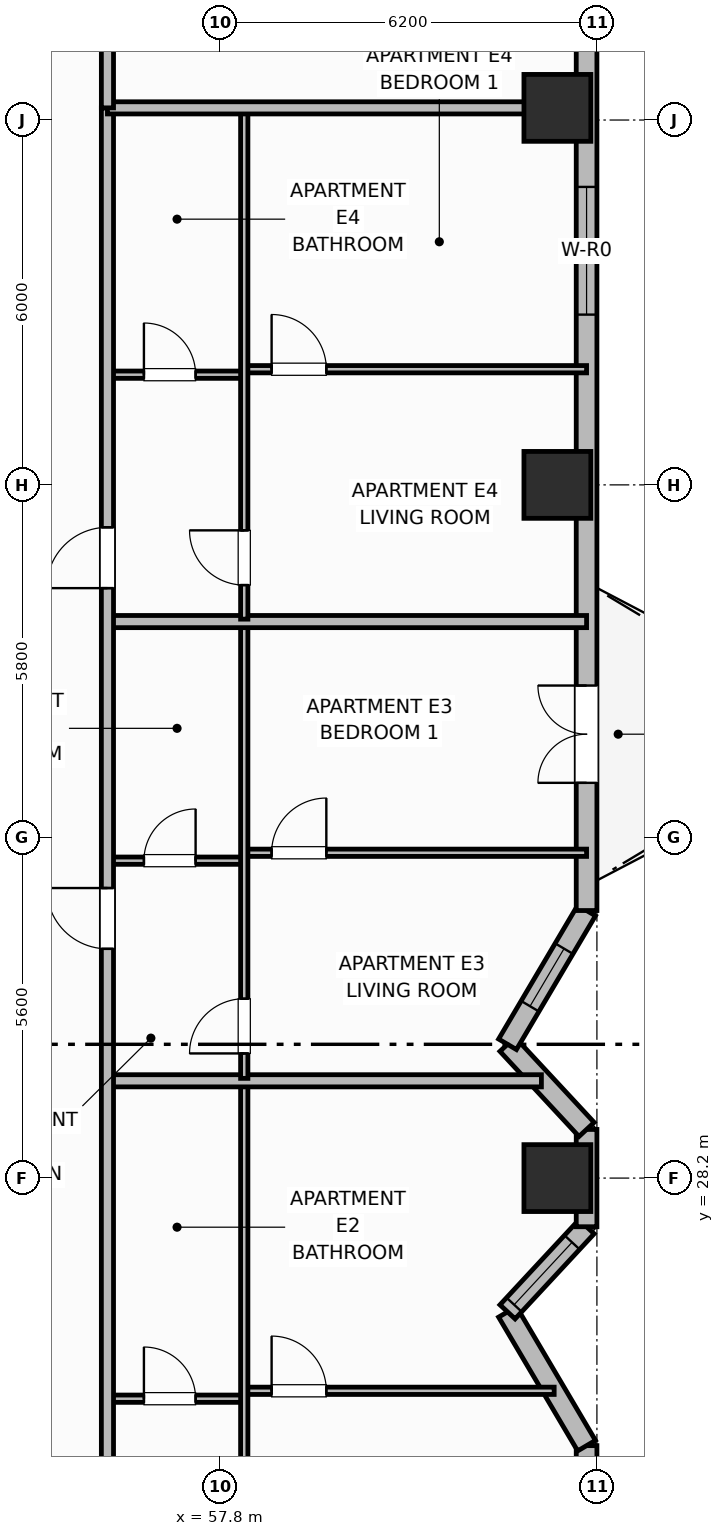
"""IFC4 building model, lengths in metres.
Left out: names, types, materials, properties, quantities, classifications, styles, units other than length and angle.
Written with IfcOpenShell. Run it as: python <this file> out.ifc"""

import sys

from ifc_helpers import new_model, si_unit, direction, frame, frame_2d, origin, origin_2d, place, context, subcontext, project, spatial, rectangle, extrude, element, fill, save


model = new_model("IFC4")
c1 = context("Model", 3, precision=1e-05, world=origin(), true_north=direction((0.0, 1.0)))
c2 = subcontext(c1, "Body", "Model", "MODEL_VIEW")
j1 = project(units=[si_unit("LENGTHUNIT", "METRE"), si_unit("PLANEANGLEUNIT", "RADIAN")], contexts=[c1])
p1 = place(None, origin())
s1 = spatial("IfcSite", under=j1, at=p1, CompositionType="ELEMENT")
p2 = place(p1, origin())
s2 = spatial("IfcBuilding", under=s1, at=p2, CompositionType="ELEMENT")
p3 = place(p2, frame((0.0, 0.0, 110.5)))
s3 = spatial("IfcBuildingStorey", under=s2, at=p3, CompositionType="ELEMENT", Elevation=110.5)
for number, where, z_axis, x_axis in (
    (1, (63.35, 28.2, 0.0), (0.0, 0.0, 1.0), (1.0, 0.0, 0.0)),
    (2, (63.35, 39.6, 0.0), (0.0, 0.0, 1.0), (1.0, 0.0, 0.0)),
    (3, (63.35, 45.8, 0.0), (0.0, 0.0, 1.0), (1.0, 0.0, 0.0)),
):
    element("IfcColumn", number, at=place(p3, frame(where, z_axis=z_axis, x_axis=x_axis)), inside=s3, PredefinedType="COLUMN", context=c2, shape_type="SweptSolid", body=[
        extrude(rectangle(XDim=1.1, YDim=1.1, at=origin_2d()), origin(), (0.0, 0.0, 1.0), 3.7),
    ])
p4 = place(p3, frame((63.83, 9.0, 0.0), z_axis=(0.0, 0.0, 1.0), x_axis=(0.0, 1.0, 0.0)))
e4 = element("IfcWall", 4, at=p4, inside=s3, PredefinedType="SOLIDWALL", context=c2, shape_type="SweptSolid", body=[
    extrude(rectangle(XDim=14.8, YDim=0.34, at=frame_2d((7.4, 0.0))), origin(), (0.0, 0.0, 1.0), 2.7),
])
p5 = place(p4, frame((4.15, 0.0, 0.93)))
e5 = element("IfcOpeningElement", 5, at=p5, cuts=e4, PredefinedType="OPENING", context=c2, shape_type="SweptSolid", body=[
    extrude(rectangle(XDim=1.1, YDim=1.65, at=frame_2d((0.55, 0.825))), frame((0.0, 0.18, 0.0), z_axis=(0.0, -1.0, 0.0), x_axis=(1.0, 0.0, 0.0)), (0.0, 0.0, 1.0), 0.36),
])
p6 = place(p4, frame((9.2, 0.0, 0.93)))
e6 = element("IfcOpeningElement", 6, at=p6, cuts=e4, PredefinedType="OPENING", context=c2, shape_type="SweptSolid", body=[
    extrude(rectangle(XDim=1.1, YDim=1.65, at=frame_2d((0.55, 0.825))), frame((0.0, 0.18, 0.0), z_axis=(0.0, -1.0, 0.0), x_axis=(1.0, 0.0, 0.0)), (0.0, 0.0, 1.0), 0.36),
])
p7 = place(p4, frame((12.25, 0.0, 0.93)))
e7 = element("IfcOpeningElement", 7, at=p7, cuts=e4, PredefinedType="OPENING", context=c2, shape_type="SweptSolid", body=[
    extrude(rectangle(XDim=1.1, YDim=1.65, at=frame_2d((0.55, 0.825))), frame((0.0, 0.18, 0.0), z_axis=(0.0, -1.0, 0.0), x_axis=(1.0, 0.0, 0.0)), (0.0, 0.0, 1.0), 0.36),
])
p8 = place(p3, frame((63.83, 23.8, 0.0), z_axis=(0.0, 0.0, 1.0), x_axis=(-0.508751843651, 0.860913213734, 0.0)))
e8 = element("IfcWall", 8, at=p8, inside=s3, PredefinedType="SOLIDWALL", context=c2, shape_type="SweptSolid", body=[
    extrude(rectangle(XDim=2.555, YDim=0.34, at=frame_2d((1.278, 0.0))), origin(), (0.0, 0.0, 1.0), 2.7),
])
p9 = place(p3, frame((62.53, 26.0, 0.0), z_axis=(0.0, 0.0, 1.0), x_axis=(0.68049031116, 0.732757078722, 0.0)))
e9 = element("IfcWall", 9, at=p9, inside=s3, PredefinedType="SOLIDWALL", context=c2, shape_type="SweptSolid", body=[
    extrude(rectangle(XDim=1.91, YDim=0.34, at=frame_2d((0.955, 0.0))), origin(), (0.0, 0.0, 1.0), 2.7),
])
p10 = place(p9, frame((0.16, 0.0, 0.69)))
e10 = element("IfcOpeningElement", 10, at=p10, cuts=e9, PredefinedType="OPENING", context=c2, shape_type="SweptSolid", body=[
    extrude(rectangle(XDim=1.4, YDim=1.85, at=frame_2d((0.7, 0.925))), frame((0.0, 0.18, 0.0), z_axis=(0.0, -1.0, 0.0), x_axis=(1.0, 0.0, 0.0)), (0.0, 0.0, 1.0), 0.36),
])
p11 = place(p3, frame((63.83, 27.4, 0.0), z_axis=(0.0, 0.0, 1.0), x_axis=(0.0, 1.0, 0.0)))
e11 = element("IfcWall", 11, at=p11, inside=s3, PredefinedType="SOLIDWALL", context=c2, shape_type="SweptSolid", body=[
    extrude(rectangle(XDim=1.6, YDim=0.34, at=frame_2d((0.8, 0.0))), origin(), (0.0, 0.0, 1.0), 2.7),
])
p12 = place(p3, frame((63.83, 29.0, 0.0), z_axis=(0.0, 0.0, 1.0), x_axis=(-0.68049031116, 0.732757078722, 0.0)))
e12 = element("IfcWall", 12, at=p12, inside=s3, PredefinedType="SOLIDWALL", context=c2, shape_type="SweptSolid", body=[
    extrude(rectangle(XDim=1.91, YDim=0.34, at=frame_2d((0.955, 0.0))), origin(), (0.0, 0.0, 1.0), 2.7),
])
p13 = place(p3, frame((62.53, 30.4, 0.0), z_axis=(0.0, 0.0, 1.0), x_axis=(0.508710000703, 0.860937939218, 0.0)))
e13 = element("IfcWall", 13, at=p13, inside=s3, PredefinedType="SOLIDWALL", context=c2, shape_type="SweptSolid", body=[
    extrude(rectangle(XDim=2.556, YDim=0.34, at=frame_2d((1.278, 0.0))), origin(), (0.0, 0.0, 1.0), 2.7),
])
p14 = place(p13, frame((0.728, 0.0, 0.89)))
e14 = element("IfcOpeningElement", 14, at=p14, cuts=e13, PredefinedType="OPENING", context=c2, shape_type="SweptSolid", body=[
    extrude(rectangle(XDim=1.1, YDim=1.65, at=frame_2d((0.55, 0.825))), frame((0.0, 0.18, 0.0), z_axis=(0.0, -1.0, 0.0), x_axis=(1.0, 0.0, 0.0)), (0.0, 0.0, 1.0), 0.36),
])
p15 = place(p3, frame((63.83, 32.6, 0.0), z_axis=(0.0, 0.0, 1.0), x_axis=(0.0, 1.0, 0.0)))
e15 = element("IfcWall", 15, at=p15, inside=s3, PredefinedType="SOLIDWALL", context=c2, shape_type="SweptSolid", body=[
    extrude(rectangle(XDim=14.8, YDim=0.34, at=frame_2d((7.4, 0.0))), origin(), (0.0, 0.0, 1.0), 2.7),
])
p16 = place(p15, frame((2.1, 0.0, 0.0)))
e16 = element("IfcOpeningElement", 16, at=p16, cuts=e15, PredefinedType="OPENING", context=c2, shape_type="SweptSolid", body=[
    extrude(rectangle(XDim=1.6, YDim=2.1, at=frame_2d((0.8, 1.05))), frame((0.0, 0.18, 0.0), z_axis=(0.0, -1.0, 0.0), x_axis=(1.0, 0.0, 0.0)), (0.0, 0.0, 1.0), 0.36),
])
p17 = place(p15, frame((9.8, 0.0, 0.68)))
e17 = element("IfcOpeningElement", 17, at=p17, cuts=e15, PredefinedType="OPENING", context=c2, shape_type="SweptSolid", body=[
    extrude(rectangle(XDim=2.1, YDim=1.9, at=frame_2d((1.05, 0.95))), frame((0.0, 0.18, 0.0), z_axis=(0.0, -1.0, 0.0), x_axis=(1.0, 0.0, 0.0)), (0.0, 0.0, 1.0), 0.36),
])
p18 = place(p3, frame((55.95, 24.572, 0.0), z_axis=(0.0, 0.0, 1.0), x_axis=(1.0, 0.0, 0.0)))
e18 = element("IfcWall", 18, at=p18, inside=s3, PredefinedType="PARTITIONING", context=c2, shape_type="SweptSolid", body=[
    extrude(rectangle(XDim=2.25, YDim=0.12, at=frame_2d((1.125, 0.0))), origin(), (0.0, 0.0, 1.0), 2.53),
])
p19 = place(p18, frame((0.6, 0.0, 0.0)))
e19 = element("IfcOpeningElement", 19, at=p19, cuts=e18, PredefinedType="OPENING", context=c2, shape_type="SweptSolid", body=[
    extrude(rectangle(XDim=0.85, YDim=2.1, at=frame_2d((0.425, 1.05))), frame((0.0, 0.07, 0.0), z_axis=(0.0, -1.0, 0.0), x_axis=(1.0, 0.0, 0.0)), (0.0, 0.0, 1.0), 0.14),
])
p20 = place(p3, frame((58.2, 24.702, 0.0), z_axis=(0.0, 0.0, 1.0), x_axis=(1.0, 0.0, 0.0)))
e20 = element("IfcWall", 20, at=p20, inside=s3, PredefinedType="PARTITIONING", context=c2, shape_type="SweptSolid", body=[
    extrude(rectangle(XDim=5.097, YDim=0.12, at=frame_2d((2.549, 0.0))), origin(), (0.0, 0.0, 1.0), 2.53),
])
p21 = place(p20, frame((0.45, 0.0, 0.0)))
e21 = element("IfcOpeningElement", 21, at=p21, cuts=e20, PredefinedType="OPENING", context=c2, shape_type="SweptSolid", body=[
    extrude(rectangle(XDim=0.9, YDim=2.1, at=frame_2d((0.45, 1.05))), frame((0.0, 0.07, 0.0), z_axis=(0.0, -1.0, 0.0), x_axis=(1.0, 0.0, 0.0)), (0.0, 0.0, 1.0), 0.14),
])
p22 = place(p3, frame((58.2, 19.792, 0.0), z_axis=(0.0, 0.0, 1.0), x_axis=(0.0, 1.0, 0.0)))
e22 = element("IfcWall", 22, at=p22, inside=s3, PredefinedType="PARTITIONING", context=c2, shape_type="SweptSolid", body=[
    extrude(rectangle(XDim=9.968, YDim=0.12, at=frame_2d((4.984, 0.0))), origin(), (0.0, 0.0, 1.0), 2.53),
])
p23 = place(p22, frame((0.41, 0.0, 0.0)))
e23 = element("IfcOpeningElement", 23, at=p23, cuts=e22, PredefinedType="OPENING", context=c2, shape_type="SweptSolid", body=[
    extrude(rectangle(XDim=0.9, YDim=2.1, at=frame_2d((0.45, 1.05))), frame((0.0, 0.07, 0.0), z_axis=(0.0, -1.0, 0.0), x_axis=(1.0, 0.0, 0.0)), (0.0, 0.0, 1.0), 0.14),
])
p24 = place(p3, frame((55.95, 29.8, 0.0), z_axis=(0.0, 0.0, 1.0), x_axis=(1.0, 0.0, 0.0)))
e24 = element("IfcWall", 24, at=p24, inside=s3, PredefinedType="PARTITIONING", context=c2, shape_type="SweptSolid", body=[
    extrude(rectangle(XDim=7.137, YDim=0.2, at=frame_2d((3.569, 0.0))), origin(), (0.0, 0.0, 1.0), 2.53),
])
p25 = place(p3, frame((55.95, 33.42, 0.0), z_axis=(0.0, 0.0, 1.0), x_axis=(1.0, 0.0, 0.0)))
e25 = element("IfcWall", 25, at=p25, inside=s3, PredefinedType="PARTITIONING", context=c2, shape_type="SweptSolid", body=[
    extrude(rectangle(XDim=2.25, YDim=0.12, at=frame_2d((1.125, 0.0))), origin(), (0.0, 0.0, 1.0), 2.53),
])
p26 = place(p25, frame((0.6, 0.0, 0.0)))
e26 = element("IfcOpeningElement", 26, at=p26, cuts=e25, PredefinedType="OPENING", context=c2, shape_type="SweptSolid", body=[
    extrude(rectangle(XDim=0.85, YDim=2.1, at=frame_2d((0.425, 1.05))), frame((0.0, 0.07, 0.0), z_axis=(0.0, -1.0, 0.0), x_axis=(1.0, 0.0, 0.0)), (0.0, 0.0, 1.0), 0.14),
])
p27 = place(p3, frame((58.2, 33.55, 0.0), z_axis=(0.0, 0.0, 1.0), x_axis=(1.0, 0.0, 0.0)))
e27 = element("IfcWall", 27, at=p27, inside=s3, PredefinedType="PARTITIONING", context=c2, shape_type="SweptSolid", body=[
    extrude(rectangle(XDim=5.63, YDim=0.12, at=frame_2d((2.815, 0.0))), origin(), (0.0, 0.0, 1.0), 2.53),
])
p28 = place(p27, frame((0.45, 0.0, 0.0)))
e28 = element("IfcOpeningElement", 28, at=p28, cuts=e27, PredefinedType="OPENING", context=c2, shape_type="SweptSolid", body=[
    extrude(rectangle(XDim=0.9, YDim=2.1, at=frame_2d((0.45, 1.05))), frame((0.0, 0.07, 0.0), z_axis=(0.0, -1.0, 0.0), x_axis=(1.0, 0.0, 0.0)), (0.0, 0.0, 1.0), 0.14),
])
p29 = place(p3, frame((58.2, 29.84, 0.0), z_axis=(0.0, 0.0, 1.0), x_axis=(0.0, 1.0, 0.0)))
e29 = element("IfcWall", 29, at=p29, inside=s3, PredefinedType="PARTITIONING", context=c2, shape_type="SweptSolid", body=[
    extrude(rectangle(XDim=7.472, YDim=0.12, at=frame_2d((3.736, 0.0))), origin(), (0.0, 0.0, 1.0), 2.53),
])
p30 = place(p29, frame((0.41, 0.0, 0.0)))
e30 = element("IfcOpeningElement", 30, at=p30, cuts=e29, PredefinedType="OPENING", context=c2, shape_type="SweptSolid", body=[
    extrude(rectangle(XDim=0.9, YDim=2.1, at=frame_2d((0.45, 1.05))), frame((0.0, 0.07, 0.0), z_axis=(0.0, -1.0, 0.0), x_axis=(1.0, 0.0, 0.0)), (0.0, 0.0, 1.0), 0.14),
])
p31 = place(p3, frame((55.95, 37.352, 0.0), z_axis=(0.0, 0.0, 1.0), x_axis=(1.0, 0.0, 0.0)))
e31 = element("IfcWall", 31, at=p31, inside=s3, PredefinedType="PARTITIONING", context=c2, shape_type="SweptSolid", body=[
    extrude(rectangle(XDim=7.88, YDim=0.2, at=frame_2d((3.94, 0.0))), origin(), (0.0, 0.0, 1.0), 2.53),
])
p32 = place(p3, frame((55.95, 41.412, 0.0), z_axis=(0.0, 0.0, 1.0), x_axis=(1.0, 0.0, 0.0)))
e32 = element("IfcWall", 32, at=p32, inside=s3, PredefinedType="PARTITIONING", context=c2, shape_type="SweptSolid", body=[
    extrude(rectangle(XDim=2.25, YDim=0.12, at=frame_2d((1.125, 0.0))), origin(), (0.0, 0.0, 1.0), 2.53),
])
p33 = place(p32, frame((0.6, 0.0, 0.0)))
e33 = element("IfcOpeningElement", 33, at=p33, cuts=e32, PredefinedType="OPENING", context=c2, shape_type="SweptSolid", body=[
    extrude(rectangle(XDim=0.85, YDim=2.1, at=frame_2d((0.425, 1.05))), frame((0.0, 0.07, 0.0), z_axis=(0.0, -1.0, 0.0), x_axis=(1.0, 0.0, 0.0)), (0.0, 0.0, 1.0), 0.14),
])
p34 = place(p3, frame((58.2, 41.502, 0.0), z_axis=(0.0, 0.0, 1.0), x_axis=(1.0, 0.0, 0.0)))
e34 = element("IfcWall", 34, at=p34, inside=s3, PredefinedType="PARTITIONING", context=c2, shape_type="SweptSolid", body=[
    extrude(rectangle(XDim=5.63, YDim=0.12, at=frame_2d((2.815, 0.0))), origin(), (0.0, 0.0, 1.0), 2.53),
])
p35 = place(p34, frame((0.45, 0.0, 0.0)))
e35 = element("IfcOpeningElement", 35, at=p35, cuts=e34, PredefinedType="OPENING", context=c2, shape_type="SweptSolid", body=[
    extrude(rectangle(XDim=0.9, YDim=2.1, at=frame_2d((0.45, 1.05))), frame((0.0, 0.07, 0.0), z_axis=(0.0, -1.0, 0.0), x_axis=(1.0, 0.0, 0.0)), (0.0, 0.0, 1.0), 0.14),
])
p36 = place(p3, frame((58.2, 37.392, 0.0), z_axis=(0.0, 0.0, 1.0), x_axis=(0.0, 1.0, 0.0)))
e36 = element("IfcWall", 36, at=p36, inside=s3, PredefinedType="PARTITIONING", context=c2, shape_type="SweptSolid", body=[
    extrude(rectangle(XDim=8.368, YDim=0.12, at=frame_2d((4.184, 0.0))), origin(), (0.0, 0.0, 1.0), 2.53),
])
p37 = place(p36, frame((0.56, 0.0, 0.0)))
e37 = element("IfcOpeningElement", 37, at=p37, cuts=e36, PredefinedType="OPENING", context=c2, shape_type="SweptSolid", body=[
    extrude(rectangle(XDim=0.9, YDim=2.1, at=frame_2d((0.45, 1.05))), frame((0.0, 0.07, 0.0), z_axis=(0.0, -1.0, 0.0), x_axis=(1.0, 0.0, 0.0)), (0.0, 0.0, 1.0), 0.14),
])
p38 = place(p3, frame((55.95, 10.6, 0.0), z_axis=(0.0, 0.0, 1.0), x_axis=(0.0, 1.0, 0.0)))
e38 = element("IfcWall", 38, at=p38, inside=s3, PredefinedType="PARTITIONING", context=c2, shape_type="SweptSolid", body=[
    extrude(rectangle(XDim=35.2, YDim=0.2, at=frame_2d((17.6, 0.0))), origin(), (0.0, 0.0, 1.0), 2.53),
])
p39 = place(p38, frame((2.65, 0.0, 0.0)))
e39 = element("IfcOpeningElement", 39, at=p39, cuts=e38, PredefinedType="OPENING", context=c2, shape_type="SweptSolid", body=[
    extrude(rectangle(XDim=1.0, YDim=2.15, at=frame_2d((0.5, 1.075))), frame((0.0, 0.11, 0.0), z_axis=(0.0, -1.0, 0.0), x_axis=(1.0, 0.0, 0.0)), (0.0, 0.0, 1.0), 0.22),
])
p40 = place(p38, frame((11.352, 0.0, 0.0)))
e40 = element("IfcOpeningElement", 40, at=p40, cuts=e38, PredefinedType="OPENING", context=c2, shape_type="SweptSolid", body=[
    extrude(rectangle(XDim=1.0, YDim=2.15, at=frame_2d((0.5, 1.075))), frame((0.0, 0.11, 0.0), z_axis=(0.0, -1.0, 0.0), x_axis=(1.0, 0.0, 0.0)), (0.0, 0.0, 1.0), 0.22),
])
p41 = place(p38, frame((21.37, 0.0, 0.0)))
e41 = element("IfcOpeningElement", 41, at=p41, cuts=e38, PredefinedType="OPENING", context=c2, shape_type="SweptSolid", body=[
    extrude(rectangle(XDim=1.0, YDim=2.15, at=frame_2d((0.5, 1.075))), frame((0.0, 0.11, 0.0), z_axis=(0.0, -1.0, 0.0), x_axis=(1.0, 0.0, 0.0)), (0.0, 0.0, 1.0), 0.22),
])
p42 = place(p38, frame((27.302, 0.0, 0.0)))
e42 = element("IfcOpeningElement", 42, at=p42, cuts=e38, PredefinedType="OPENING", context=c2, shape_type="SweptSolid", body=[
    extrude(rectangle(XDim=1.0, YDim=2.15, at=frame_2d((0.5, 1.075))), frame((0.0, 0.11, 0.0), z_axis=(0.0, -1.0, 0.0), x_axis=(1.0, 0.0, 0.0)), (0.0, 0.0, 1.0), 0.22),
])
p43 = place(p3, frame((55.95, 45.8, 0.0), z_axis=(0.0, 0.0, 1.0), x_axis=(1.0, 0.0, 0.0)))
e43 = element("IfcWall", 43, at=p43, inside=s3, PredefinedType="PARTITIONING", context=c2, shape_type="SweptSolid", body=[
    extrude(rectangle(XDim=7.46, YDim=0.2, at=frame_2d((3.73, 0.0))), origin(), (0.0, 0.0, 1.0), 2.53),
])
p44 = place(p3, frame((55.95, 45.8, 0.0), z_axis=(0.0, 0.0, 1.0), x_axis=(0.0, 1.0, 0.0)))
e44 = element("IfcWall", 44, at=p44, inside=s3, PredefinedType="PARTITIONING", context=c2, shape_type="SweptSolid", body=[
    extrude(rectangle(XDim=5.63, YDim=0.2, at=frame_2d((2.815, 0.0))), origin(), (0.0, 0.0, 1.0), 2.53),
])
p45 = place(p10, origin())
e45 = element("IfcWindow", 45, at=p45, inside=s3, PartitioningType="SINGLE_PANEL", PredefinedType="WINDOW", context=c2, shape_type="SweptSolid", body=[
    extrude(rectangle(XDim=1.4, YDim=1.85, at=frame_2d((0.7, 0.925))), frame((0.0, 0.03, 0.0), z_axis=(0.0, -1.0, 0.0), x_axis=(1.0, 0.0, 0.0)), (0.0, 0.0, 1.0), 0.06),
])
fill(e10, e45)
p46 = place(p14, origin())
e46 = element("IfcWindow", 46, at=p46, inside=s3, PartitioningType="SINGLE_PANEL", PredefinedType="WINDOW", context=c2, shape_type="SweptSolid", body=[
    extrude(rectangle(XDim=1.1, YDim=1.65, at=frame_2d((0.55, 0.825))), frame((0.0, 0.03, 0.0), z_axis=(0.0, -1.0, 0.0), x_axis=(1.0, 0.0, 0.0)), (0.0, 0.0, 1.0), 0.06),
])
fill(e14, e46)
p47 = place(p16, origin())
e47 = element("IfcDoor", 47, at=p47, inside=s3, OperationType="DOUBLE_DOOR_SINGLE_SWING", PredefinedType="DOOR", context=c2, shape_type="SweptSolid", body=[
    extrude(rectangle(XDim=1.6, YDim=2.1, at=frame_2d((0.8, 1.05))), frame((0.0, 0.025, 0.0), z_axis=(0.0, -1.0, 0.0), x_axis=(1.0, 0.0, 0.0)), (0.0, 0.0, 1.0), 0.05),
])
fill(e16, e47)
p48 = place(p17, origin())
e48 = element("IfcWindow", 48, at=p48, inside=s3, PartitioningType="SINGLE_PANEL", PredefinedType="WINDOW", context=c2, shape_type="SweptSolid", body=[
    extrude(rectangle(XDim=2.1, YDim=1.9, at=frame_2d((1.05, 0.95))), frame((0.0, 0.03, 0.0), z_axis=(0.0, -1.0, 0.0), x_axis=(1.0, 0.0, 0.0)), (0.0, 0.0, 1.0), 0.06),
])
fill(e17, e48)
p49 = place(p19, origin())
e49 = element("IfcDoor", 49, at=p49, inside=s3, OperationType="SINGLE_SWING_LEFT", PredefinedType="DOOR", context=c2, shape_type="SweptSolid", body=[
    extrude(rectangle(XDim=0.85, YDim=2.1, at=frame_2d((0.425, 1.05))), frame((0.0, 0.025, 0.0), z_axis=(0.0, -1.0, 0.0), x_axis=(1.0, 0.0, 0.0)), (0.0, 0.0, 1.0), 0.05),
])
fill(e19, e49)
p50 = place(p21, origin())
e50 = element("IfcDoor", 50, at=p50, inside=s3, OperationType="SINGLE_SWING_LEFT", PredefinedType="DOOR", context=c2, shape_type="SweptSolid", body=[
    extrude(rectangle(XDim=0.9, YDim=2.1, at=frame_2d((0.45, 1.05))), frame((0.0, 0.025, 0.0), z_axis=(0.0, -1.0, 0.0), x_axis=(1.0, 0.0, 0.0)), (0.0, 0.0, 1.0), 0.05),
])
fill(e21, e50)
p51 = place(p26, origin())
e51 = element("IfcDoor", 51, at=p51, inside=s3, OperationType="SINGLE_SWING_RIGHT", PredefinedType="DOOR", context=c2, shape_type="SweptSolid", body=[
    extrude(rectangle(XDim=0.85, YDim=2.1, at=frame_2d((0.425, 1.05))), frame((0.0, 0.025, 0.0), z_axis=(0.0, -1.0, 0.0), x_axis=(1.0, 0.0, 0.0)), (0.0, 0.0, 1.0), 0.05),
])
fill(e26, e51)
p52 = place(p28, origin())
e52 = element("IfcDoor", 52, at=p52, inside=s3, OperationType="SINGLE_SWING_RIGHT", PredefinedType="DOOR", context=c2, shape_type="SweptSolid", body=[
    extrude(rectangle(XDim=0.9, YDim=2.1, at=frame_2d((0.45, 1.05))), frame((0.0, 0.025, 0.0), z_axis=(0.0, -1.0, 0.0), x_axis=(1.0, 0.0, 0.0)), (0.0, 0.0, 1.0), 0.05),
])
fill(e28, e52)
p53 = place(p30, origin())
e53 = element("IfcDoor", 53, at=p53, inside=s3, OperationType="SINGLE_SWING_LEFT", PredefinedType="DOOR", context=c2, shape_type="SweptSolid", body=[
    extrude(rectangle(XDim=0.9, YDim=2.1, at=frame_2d((0.45, 1.05))), frame((0.0, 0.025, 0.0), z_axis=(0.0, -1.0, 0.0), x_axis=(1.0, 0.0, 0.0)), (0.0, 0.0, 1.0), 0.05),
])
fill(e30, e53)
p54 = place(p33, origin())
e54 = element("IfcDoor", 54, at=p54, inside=s3, OperationType="SINGLE_SWING_LEFT", PredefinedType="DOOR", context=c2, shape_type="SweptSolid", body=[
    extrude(rectangle(XDim=0.85, YDim=2.1, at=frame_2d((0.425, 1.05))), frame((0.0, 0.025, 0.0), z_axis=(0.0, -1.0, 0.0), x_axis=(1.0, 0.0, 0.0)), (0.0, 0.0, 1.0), 0.05),
])
fill(e33, e54)
p55 = place(p35, origin())
e55 = element("IfcDoor", 55, at=p55, inside=s3, OperationType="SINGLE_SWING_LEFT", PredefinedType="DOOR", context=c2, shape_type="SweptSolid", body=[
    extrude(rectangle(XDim=0.9, YDim=2.1, at=frame_2d((0.45, 1.05))), frame((0.0, 0.025, 0.0), z_axis=(0.0, -1.0, 0.0), x_axis=(1.0, 0.0, 0.0)), (0.0, 0.0, 1.0), 0.05),
])
fill(e35, e55)
p56 = place(p37, origin())
e56 = element("IfcDoor", 56, at=p56, inside=s3, OperationType="SINGLE_SWING_RIGHT", PredefinedType="DOOR", context=c2, shape_type="SweptSolid", body=[
    extrude(rectangle(XDim=0.9, YDim=2.1, at=frame_2d((0.45, 1.05))), frame((0.0, 0.025, 0.0), z_axis=(0.0, -1.0, 0.0), x_axis=(1.0, 0.0, 0.0)), (0.0, 0.0, 1.0), 0.05),
])
fill(e37, e56)
p57 = place(p41, origin())
e57 = element("IfcDoor", 57, at=p57, inside=s3, OperationType="SINGLE_SWING_RIGHT", PredefinedType="DOOR", context=c2, shape_type="SweptSolid", body=[
    extrude(rectangle(XDim=1.0, YDim=2.15, at=frame_2d((0.5, 1.075))), frame((0.0, 0.025, 0.0), z_axis=(0.0, -1.0, 0.0), x_axis=(1.0, 0.0, 0.0)), (0.0, 0.0, 1.0), 0.05),
])
fill(e41, e57)
p58 = place(p42, origin())
e58 = element("IfcDoor", 58, at=p58, inside=s3, OperationType="SINGLE_SWING_LEFT", PredefinedType="DOOR", context=c2, shape_type="SweptSolid", body=[
    extrude(rectangle(XDim=1.0, YDim=2.15, at=frame_2d((0.5, 1.075))), frame((0.0, 0.025, 0.0), z_axis=(0.0, -1.0, 0.0), x_axis=(1.0, 0.0, 0.0)), (0.0, 0.0, 1.0), 0.05),
])
fill(e42, e58)
save(model, sys.argv[1])
